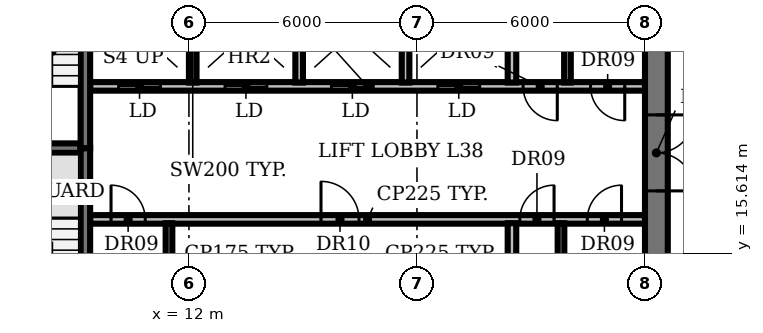
"""IFC4 building model, lengths in metres.
Left out: names, types, materials, properties, quantities, classifications, styles, units other than length and angle.
Written with IfcOpenShell. Run it as: python <this file> out.ifc"""

import sys

from ifc_helpers import new_model, si_unit, direction, frame, frame_2d, origin, place, context, subcontext, project, spatial, rectangle, extrude, element, fill, save


model = new_model("IFC4")
c1 = context("Model", 3, precision=1e-05, world=origin(), true_north=direction((0.0, 1.0)))
c2 = subcontext(c1, "Body", "Model", "MODEL_VIEW")
j1 = project(units=[si_unit("LENGTHUNIT", "METRE"), si_unit("PLANEANGLEUNIT", "RADIAN")], contexts=[c1])
p1 = place(None, origin())
s1 = spatial("IfcSite", under=j1, at=p1, CompositionType="ELEMENT")
p2 = place(p1, origin())
s2 = spatial("IfcBuilding", under=s1, at=p2, CompositionType="ELEMENT")
p3 = place(p2, frame((0.0, 0.0, 171.8)))
s3 = spatial("IfcBuildingStorey", under=s2, at=p3, CompositionType="ELEMENT", Elevation=171.8)
p4 = place(p3, frame((9.4, 16.5, 0.0), z_axis=(0.0, 0.0, 1.0), x_axis=(1.0, 0.0, 0.0)))
e1 = element("IfcWall", 1, at=p4, inside=s3, PredefinedType="PARTITIONING", context=c2, shape_type="SweptSolid", body=[
    extrude(rectangle(XDim=14.6, YDim=0.225, at=frame_2d((7.3, 0.0))), origin(), (0.0, 0.0, 1.0), 3.85),
])
p5 = place(p4, frame((0.55, 0.0, 0.0)))
e2 = element("IfcOpeningElement", 2, at=p5, cuts=e1, PredefinedType="OPENING", context=c2, shape_type="SweptSolid", body=[
    extrude(rectangle(XDim=0.9, YDim=2.1, at=frame_2d((0.45, 1.05))), frame((0.0, 0.123, 0.0), z_axis=(0.0, -1.0, 0.0), x_axis=(1.0, 0.0, 0.0)), (0.0, 0.0, 1.0), 0.245),
])
p6 = place(p4, frame((6.075, 0.0, 0.0)))
e3 = element("IfcOpeningElement", 3, at=p6, cuts=e1, PredefinedType="OPENING", context=c2, shape_type="SweptSolid", body=[
    extrude(rectangle(XDim=1.0, YDim=2.1, at=frame_2d((0.5, 1.05))), frame((0.0, 0.123, 0.0), z_axis=(0.0, -1.0, 0.0), x_axis=(1.0, 0.0, 0.0)), (0.0, 0.0, 1.0), 0.245),
])
p7 = place(p4, frame((11.308, 0.0, 0.0)))
e4 = element("IfcOpeningElement", 4, at=p7, cuts=e1, PredefinedType="OPENING", context=c2, shape_type="SweptSolid", body=[
    extrude(rectangle(XDim=0.9, YDim=2.1, at=frame_2d((0.45, 1.05))), frame((0.0, 0.123, 0.0), z_axis=(0.0, -1.0, 0.0), x_axis=(1.0, 0.0, 0.0)), (0.0, 0.0, 1.0), 0.245),
])
p8 = place(p4, frame((13.083, 0.0, 0.0)))
e5 = element("IfcOpeningElement", 5, at=p8, cuts=e1, PredefinedType="OPENING", context=c2, shape_type="SweptSolid", body=[
    extrude(rectangle(XDim=0.9, YDim=2.1, at=frame_2d((0.45, 1.05))), frame((0.0, 0.123, 0.0), z_axis=(0.0, -1.0, 0.0), x_axis=(1.0, 0.0, 0.0)), (0.0, 0.0, 1.0), 0.245),
])
p9 = place(p3, frame((6.0, 18.375, 0.0), z_axis=(0.0, 0.0, 1.0), x_axis=(1.0, 0.0, 0.0)))
e6 = element("IfcWall", 6, at=p9, inside=s3, PredefinedType="SHEAR", context=c2, shape_type="SweptSolid", body=[
    extrude(rectangle(XDim=3.15, YDim=0.25, at=frame_2d((1.575, 0.0))), origin(), (0.0, 0.0, 1.0), 3.85),
])
p10 = place(p3, frame((24.0, 20.0, 0.0), z_axis=(0.0, 0.0, 1.0), x_axis=(-1.0, 0.0, 0.0)))
e7 = element("IfcWall", 7, at=p10, inside=s3, PredefinedType="PARTITIONING", context=c2, shape_type="SweptSolid", body=[
    extrude(rectangle(XDim=14.6, YDim=0.225, at=frame_2d((7.3, 0.0))), origin(), (0.0, 0.0, 1.0), 3.85),
])
p11 = place(p10, frame((12.75, 0.0, 0.0)))
e8 = element("IfcOpeningElement", 8, at=p11, cuts=e7, PredefinedType="OPENING", context=c2, shape_type="SweptSolid", body=[
    extrude(rectangle(XDim=1.1, YDim=2.1, at=frame_2d((0.55, 1.05))), frame((0.0, 0.123, 0.0), z_axis=(0.0, -1.0, 0.0), x_axis=(1.0, 0.0, 0.0)), (0.0, 0.0, 1.0), 0.245),
])
p12 = place(p10, frame((9.95, 0.0, 0.0)))
e9 = element("IfcOpeningElement", 9, at=p12, cuts=e7, PredefinedType="OPENING", context=c2, shape_type="SweptSolid", body=[
    extrude(rectangle(XDim=1.1, YDim=2.1, at=frame_2d((0.55, 1.05))), frame((0.0, 0.123, 0.0), z_axis=(0.0, -1.0, 0.0), x_axis=(1.0, 0.0, 0.0)), (0.0, 0.0, 1.0), 0.245),
])
p13 = place(p10, frame((7.15, 0.0, 0.0)))
e10 = element("IfcOpeningElement", 10, at=p13, cuts=e7, PredefinedType="OPENING", context=c2, shape_type="SweptSolid", body=[
    extrude(rectangle(XDim=1.1, YDim=2.1, at=frame_2d((0.55, 1.05))), frame((0.0, 0.123, 0.0), z_axis=(0.0, -1.0, 0.0), x_axis=(1.0, 0.0, 0.0)), (0.0, 0.0, 1.0), 0.245),
])
p14 = place(p10, frame((4.35, 0.0, 0.0)))
e11 = element("IfcOpeningElement", 11, at=p14, cuts=e7, PredefinedType="OPENING", context=c2, shape_type="SweptSolid", body=[
    extrude(rectangle(XDim=1.1, YDim=2.1, at=frame_2d((0.55, 1.05))), frame((0.0, 0.123, 0.0), z_axis=(0.0, -1.0, 0.0), x_axis=(1.0, 0.0, 0.0)), (0.0, 0.0, 1.0), 0.245),
])
p15 = place(p10, frame((2.308, 0.0, 0.0)))
e12 = element("IfcOpeningElement", 12, at=p15, cuts=e7, PredefinedType="OPENING", context=c2, shape_type="SweptSolid", body=[
    extrude(rectangle(XDim=0.9, YDim=2.1, at=frame_2d((0.45, 1.05))), frame((0.0, 0.123, 0.0), z_axis=(0.0, -1.0, 0.0), x_axis=(1.0, 0.0, 0.0)), (0.0, 0.0, 1.0), 0.245),
])
p16 = place(p10, frame((0.532, 0.0, 0.0)))
e13 = element("IfcOpeningElement", 13, at=p16, cuts=e7, PredefinedType="OPENING", context=c2, shape_type="SweptSolid", body=[
    extrude(rectangle(XDim=0.9, YDim=2.1, at=frame_2d((0.45, 1.05))), frame((0.0, 0.123, 0.0), z_axis=(0.0, -1.0, 0.0), x_axis=(1.0, 0.0, 0.0)), (0.0, 0.0, 1.0), 0.245),
])
p17 = place(p3, frame((9.275, 18.375, 0.0), z_axis=(0.0, 0.0, 1.0), x_axis=(0.0, -1.0, 0.0)))
e14 = element("IfcWall", 14, at=p17, inside=s3, PredefinedType="SHEAR", context=c2, shape_type="SweptSolid", body=[
    extrude(rectangle(XDim=6.55, YDim=0.25, at=frame_2d((3.275, 0.0))), origin(), (0.0, 0.0, 1.0), 3.85),
])
p18 = place(p17, frame((5.075, 0.0, 0.0)))
e15 = element("IfcOpeningElement", 15, at=p18, cuts=e14, PredefinedType="OPENING", context=c2, shape_type="SweptSolid", body=[
    extrude(rectangle(XDim=1.0, YDim=2.1, at=frame_2d((0.5, 1.05))), frame((0.0, 0.135, 0.0), z_axis=(0.0, -1.0, 0.0), x_axis=(1.0, 0.0, 0.0)), (0.0, 0.0, 1.0), 0.27),
])
p19 = place(p3, frame((9.275, 18.375, 0.0), z_axis=(0.0, 0.0, 1.0), x_axis=(0.0, 1.0, 0.0)))
e16 = element("IfcWall", 16, at=p19, inside=s3, PredefinedType="SHEAR", context=c2, shape_type="SweptSolid", body=[
    extrude(rectangle(XDim=6.425, YDim=0.25, at=frame_2d((3.212, 0.0))), origin(), (0.0, 0.0, 1.0), 3.85),
])
p20 = place(p3, frame((11.475, 13.8, 0.0), z_axis=(0.0, 0.0, 1.0), x_axis=(0.0, 1.0, 0.0)))
e17 = element("IfcWall", 17, at=p20, inside=s3, PredefinedType="PARTITIONING", context=c2, shape_type="SweptSolid", body=[
    extrude(rectangle(XDim=2.6, YDim=0.175, at=frame_2d((1.3, 0.0))), origin(), (0.0, 0.0, 1.0), 3.85),
])
for number, where, z_axis, x_axis in (
    (18, (12.1, 20.1, 0.0), (0.0, 0.0, 1.0), (0.0, 1.0, 0.0)),
    (19, (14.9, 20.1, 0.0), (0.0, 0.0, 1.0), (0.0, 1.0, 0.0)),
    (20, (17.7, 20.1, 0.0), (0.0, 0.0, 1.0), (0.0, 1.0, 0.0)),
):
    element("IfcWall", number, at=place(p3, frame(where, z_axis=z_axis, x_axis=x_axis)), inside=s3, PredefinedType="SOLIDWALL", context=c2, shape_type="SweptSolid", body=[
        extrude(rectangle(XDim=2.6, YDim=0.2, at=frame_2d((1.3, 0.0))), origin(), (0.0, 0.0, 1.0), 3.85),
    ])
for number, where, z_axis, x_axis in (
    (21, (20.5, 13.8, 0.0), (0.0, 0.0, 1.0), (0.0, 1.0, 0.0)),
    (22, (20.5, 20.1, 0.0), (0.0, 0.0, 1.0), (0.0, 1.0, 0.0)),
):
    element("IfcWall", number, at=place(p3, frame(where, z_axis=z_axis, x_axis=x_axis)), inside=s3, PredefinedType="PARTITIONING", context=c2, shape_type="SweptSolid", body=[
        extrude(rectangle(XDim=2.6, YDim=0.225, at=frame_2d((1.3, 0.0))), origin(), (0.0, 0.0, 1.0), 3.85),
    ])
for number, where, z_axis, x_axis in (
    (23, (21.79, 13.8, 0.0), (0.0, 0.0, 1.0), (0.0, 1.0, 0.0)),
    (24, (21.96, 20.1, 0.0), (0.0, 0.0, 1.0), (0.0, 1.0, 0.0)),
):
    element("IfcWall", number, at=place(p3, frame(where, z_axis=z_axis, x_axis=x_axis)), inside=s3, PredefinedType="PARTITIONING", context=c2, shape_type="SweptSolid", body=[
        extrude(rectangle(XDim=2.6, YDim=0.175, at=frame_2d((1.3, 0.0))), origin(), (0.0, 0.0, 1.0), 3.85),
    ])
p21 = place(p3, frame((24.3, 25.555, 0.0), z_axis=(0.0, 0.0, 1.0), x_axis=(0.0, -1.0, 0.0)))
e25 = element("IfcWall", 25, at=p21, inside=s3, PredefinedType="SHEAR", context=c2, shape_type="SweptSolid", body=[
    extrude(rectangle(XDim=20.755, YDim=0.6, at=frame_2d((10.377, 0.0))), origin(), (0.0, 0.0, 1.0), 3.85),
])
p22 = place(p21, frame((18.405, 0.0, 0.0)))
e26 = element("IfcOpeningElement", 26, at=p22, cuts=e25, PredefinedType="OPENING", context=c2, shape_type="SweptSolid", body=[
    extrude(rectangle(XDim=1.5, YDim=2.1, at=frame_2d((0.75, 1.05))), frame((0.0, 0.31, 0.0), z_axis=(0.0, -1.0, 0.0), x_axis=(1.0, 0.0, 0.0)), (0.0, 0.0, 1.0), 0.62),
])
p23 = place(p21, frame((12.305, 0.0, 0.0)))
e27 = element("IfcOpeningElement", 27, at=p23, cuts=e25, PredefinedType="OPENING", context=c2, shape_type="SweptSolid", body=[
    extrude(rectangle(XDim=0.9, YDim=2.1, at=frame_2d((0.45, 1.05))), frame((0.0, 0.31, 0.0), z_axis=(0.0, -1.0, 0.0), x_axis=(1.0, 0.0, 0.0)), (0.0, 0.0, 1.0), 0.62),
])
p24 = place(p21, frame((6.305, 0.0, 0.0)))
e28 = element("IfcOpeningElement", 28, at=p24, cuts=e25, PredefinedType="OPENING", context=c2, shape_type="SweptSolid", body=[
    extrude(rectangle(XDim=2.0, YDim=2.1, at=frame_2d((1.0, 1.05))), frame((0.0, 0.31, 0.0), z_axis=(0.0, -1.0, 0.0), x_axis=(1.0, 0.0, 0.0)), (0.0, 0.0, 1.0), 0.62),
])
p25 = place(p5, origin())
e29 = element("IfcDoor", 29, at=p25, inside=s3, OperationType="SINGLE_SWING_LEFT", PredefinedType="DOOR", context=c2, shape_type="SweptSolid", body=[
    extrude(rectangle(XDim=0.9, YDim=2.1, at=frame_2d((0.45, 1.05))), frame((0.0, 0.025, 0.0), z_axis=(0.0, -1.0, 0.0), x_axis=(1.0, 0.0, 0.0)), (0.0, 0.0, 1.0), 0.05),
])
fill(e2, e29)
p26 = place(p6, origin())
e30 = element("IfcDoor", 30, at=p26, inside=s3, OperationType="SINGLE_SWING_LEFT", PredefinedType="DOOR", context=c2, shape_type="SweptSolid", body=[
    extrude(rectangle(XDim=1.0, YDim=2.1, at=frame_2d((0.5, 1.05))), frame((0.0, 0.025, 0.0), z_axis=(0.0, -1.0, 0.0), x_axis=(1.0, 0.0, 0.0)), (0.0, 0.0, 1.0), 0.05),
])
fill(e3, e30)
p27 = place(p7, origin())
e31 = element("IfcDoor", 31, at=p27, inside=s3, OperationType="SINGLE_SWING_RIGHT", PredefinedType="DOOR", context=c2, shape_type="SweptSolid", body=[
    extrude(rectangle(XDim=0.9, YDim=2.1, at=frame_2d((0.45, 1.05))), frame((0.0, 0.025, 0.0), z_axis=(0.0, -1.0, 0.0), x_axis=(1.0, 0.0, 0.0)), (0.0, 0.0, 1.0), 0.05),
])
fill(e4, e31)
p28 = place(p8, origin())
e32 = element("IfcDoor", 32, at=p28, inside=s3, OperationType="SINGLE_SWING_RIGHT", PredefinedType="DOOR", context=c2, shape_type="SweptSolid", body=[
    extrude(rectangle(XDim=0.9, YDim=2.1, at=frame_2d((0.45, 1.05))), frame((0.0, 0.025, 0.0), z_axis=(0.0, -1.0, 0.0), x_axis=(1.0, 0.0, 0.0)), (0.0, 0.0, 1.0), 0.05),
])
fill(e5, e32)
p29 = place(p11, origin())
e33 = element("IfcDoor", 33, at=p29, inside=s3, OperationType="DOUBLE_DOOR_SLIDING", PredefinedType="DOOR", context=c2, shape_type="SweptSolid", body=[
    extrude(rectangle(XDim=1.1, YDim=2.1, at=frame_2d((0.55, 1.05))), frame((0.0, 0.025, 0.0), z_axis=(0.0, -1.0, 0.0), x_axis=(1.0, 0.0, 0.0)), (0.0, 0.0, 1.0), 0.05),
])
fill(e8, e33)
p30 = place(p12, origin())
e34 = element("IfcDoor", 34, at=p30, inside=s3, OperationType="DOUBLE_DOOR_SLIDING", PredefinedType="DOOR", context=c2, shape_type="SweptSolid", body=[
    extrude(rectangle(XDim=1.1, YDim=2.1, at=frame_2d((0.55, 1.05))), frame((0.0, 0.025, 0.0), z_axis=(0.0, -1.0, 0.0), x_axis=(1.0, 0.0, 0.0)), (0.0, 0.0, 1.0), 0.05),
])
fill(e9, e34)
p31 = place(p13, origin())
e35 = element("IfcDoor", 35, at=p31, inside=s3, OperationType="DOUBLE_DOOR_SLIDING", PredefinedType="DOOR", context=c2, shape_type="SweptSolid", body=[
    extrude(rectangle(XDim=1.1, YDim=2.1, at=frame_2d((0.55, 1.05))), frame((0.0, 0.025, 0.0), z_axis=(0.0, -1.0, 0.0), x_axis=(1.0, 0.0, 0.0)), (0.0, 0.0, 1.0), 0.05),
])
fill(e10, e35)
p32 = place(p14, origin())
e36 = element("IfcDoor", 36, at=p32, inside=s3, OperationType="DOUBLE_DOOR_SLIDING", PredefinedType="DOOR", context=c2, shape_type="SweptSolid", body=[
    extrude(rectangle(XDim=1.1, YDim=2.1, at=frame_2d((0.55, 1.05))), frame((0.0, 0.025, 0.0), z_axis=(0.0, -1.0, 0.0), x_axis=(1.0, 0.0, 0.0)), (0.0, 0.0, 1.0), 0.05),
])
fill(e11, e36)
p33 = place(p15, origin())
e37 = element("IfcDoor", 37, at=p33, inside=s3, OperationType="SINGLE_SWING_LEFT", PredefinedType="DOOR", context=c2, shape_type="SweptSolid", body=[
    extrude(rectangle(XDim=0.9, YDim=2.1, at=frame_2d((0.45, 1.05))), frame((0.0, 0.025, 0.0), z_axis=(0.0, -1.0, 0.0), x_axis=(1.0, 0.0, 0.0)), (0.0, 0.0, 1.0), 0.05),
])
fill(e12, e37)
p34 = place(p16, origin())
e38 = element("IfcDoor", 38, at=p34, inside=s3, OperationType="SINGLE_SWING_LEFT", PredefinedType="DOOR", context=c2, shape_type="SweptSolid", body=[
    extrude(rectangle(XDim=0.9, YDim=2.1, at=frame_2d((0.45, 1.05))), frame((0.0, 0.025, 0.0), z_axis=(0.0, -1.0, 0.0), x_axis=(1.0, 0.0, 0.0)), (0.0, 0.0, 1.0), 0.05),
])
fill(e13, e38)
p35 = place(p24, origin())
e39 = element("IfcDoor", 39, at=p35, inside=s3, OperationType="DOUBLE_DOOR_SINGLE_SWING", PredefinedType="DOOR", context=c2, shape_type="SweptSolid", body=[
    extrude(rectangle(XDim=2.0, YDim=2.1, at=frame_2d((1.0, 1.05))), frame((0.0, 0.025, 0.0), z_axis=(0.0, -1.0, 0.0), x_axis=(1.0, 0.0, 0.0)), (0.0, 0.0, 1.0), 0.05),
])
fill(e28, e39)
save(model, sys.argv[1])
